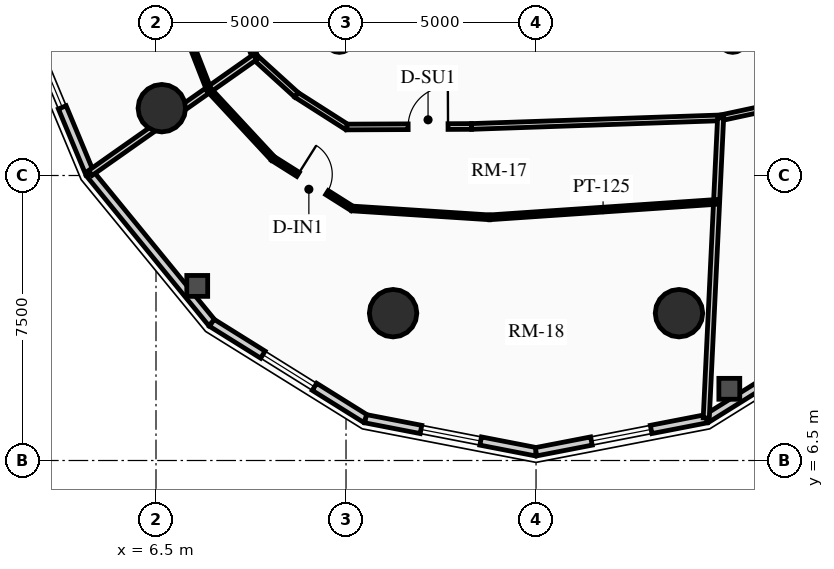
"""IFC4 building model, lengths in metres.
Left out: names, types, materials, properties, quantities, classifications, styles, units other than length and angle.
Written with IfcOpenShell. Run it as: python <this file> out.ifc"""

import sys

from ifc_helpers import new_model, si_unit, direction, frame, frame_2d, origin, origin_2d, place, context, subcontext, project, spatial, rectangle, circle, hollow_circle, extrude, source, transform, mapped, element, fill, save


model = new_model("IFC4")
c1 = context("Model", 3, precision=1e-05, world=origin(), true_north=direction((0.0, 1.0)))
c2 = subcontext(c1, "Body", "Model", "MODEL_VIEW")
j1 = project(units=[si_unit("LENGTHUNIT", "METRE"), si_unit("PLANEANGLEUNIT", "RADIAN")], contexts=[c1])
p1 = place(None, origin())
s1 = spatial("IfcSite", under=j1, at=p1, CompositionType="ELEMENT")
p2 = place(p1, origin())
s2 = spatial("IfcBuilding", under=s1, at=p2, CompositionType="ELEMENT")
p3 = place(p2, frame((0.0, 0.0, 166.15)))
s3 = spatial("IfcBuildingStorey", under=s2, at=p3, CompositionType="ELEMENT", Elevation=166.15)
for number, where, z_axis, x_axis in (
    (1, (11.325, 17.62, 0.0), (0.0, 0.0, 1.0), (1.0, 0.0, 0.0)),
    (2, (21.675, 17.62, 0.0), (0.0, 0.0, 1.0), (1.0, 0.0, 0.0)),
):
    element("IfcColumn", number, at=place(p3, frame(where, z_axis=z_axis, x_axis=x_axis)), inside=s3, PredefinedType="COLUMN", context=c2, shape_type="SweptSolid", body=[
        extrude(hollow_circle(Radius=0.38, WallThickness=0.032, at=origin_2d()), origin(), (0.0, 0.0, 1.0), 2.91),
    ])
for number, where, z_axis, x_axis in (
    (3, (6.653, 15.771, 0.0), (0.0, 0.0, 1.0), (1.0, 0.0, 0.0)),
    (4, (12.739, 10.377, 0.0), (0.0, 0.0, 1.0), (1.0, 0.0, 0.0)),
    (5, (20.261, 10.377, 0.0), (0.0, 0.0, 1.0), (1.0, 0.0, 0.0)),
):
    element("IfcColumn", number, at=place(p3, frame(where, z_axis=z_axis, x_axis=x_axis)), inside=s3, PredefinedType="USERDEFINED", context=c2, shape_type="SweptSolid", body=[
        extrude(circle(Radius=0.625, at=origin_2d()), origin(), (0.0, 0.0, 1.0), 2.91),
    ])
p4 = place(p3, frame((4.757, 14.055, 0.0), z_axis=(0.0, 0.0, 1.0), x_axis=(-0.384259959969, 0.923224936386, 0.0)))
e6 = element("IfcWall", 6, at=p4, inside=s3, PredefinedType="SOLIDWALL", context=c2, shape_type="SweptSolid", body=[
    extrude(rectangle(XDim=5.365, YDim=0.22, at=frame_2d((2.683, 0.0))), origin(), (0.0, 0.0, 1.0), 2.675),
])
m1 = source(origin(), c2, "Body", "SweptSolid", [
    extrude(rectangle(XDim=1.6, YDim=1.3, at=frame_2d((0.8, 0.65))), frame((0.0, 0.12, 0.0), z_axis=(0.0, -1.0, 0.0), x_axis=(1.0, 0.0, 0.0)), (0.0, 0.0, 1.0), 0.24),
])
p5 = place(p4, frame((1.883, 0.0, 0.65)))
e7 = element("IfcOpeningElement", 7, at=p5, cuts=e6, PredefinedType="OPENING", context=c2, shape_type="MappedRepresentation", body=[
    mapped(m1, transform((0.0, 0.0, 0.0), x_axis=(1.0, 0.0, 0.0), y_axis=(0.0, 1.0, 0.0), z_axis=(0.0, 0.0, 1.0), scale=1.0)),
])
p6 = place(p3, frame((7.968, 10.124, 0.0), z_axis=(0.0, 0.0, 1.0), x_axis=(-0.632598524901, 0.774479894053, 0.0)))
e8 = element("IfcWall", 8, at=p6, inside=s3, PredefinedType="SOLIDWALL", context=c2, shape_type="SweptSolid", body=[
    extrude(rectangle(XDim=5.076, YDim=0.22, at=frame_2d((2.538, 0.0))), origin(), (0.0, 0.0, 1.0), 2.675),
])
p7 = place(p3, frame((12.015, 7.6, 0.0), z_axis=(0.0, 0.0, 1.0), x_axis=(-0.848452391194, 0.529271707044, 0.0)))
e9 = element("IfcWall", 9, at=p7, inside=s3, PredefinedType="SOLIDWALL", context=c2, shape_type="SweptSolid", body=[
    extrude(rectangle(XDim=4.769, YDim=0.22, at=frame_2d((2.385, 0.0))), origin(), (0.0, 0.0, 1.0), 2.675),
])
p8 = place(p7, frame((1.585, 0.0, 0.65)))
e10 = element("IfcOpeningElement", 10, at=p8, cuts=e9, PredefinedType="OPENING", context=c2, shape_type="MappedRepresentation", body=[
    mapped(m1, transform((0.0, 0.0, 0.0), x_axis=(1.0, 0.0, 0.0), y_axis=(0.0, 1.0, 0.0), z_axis=(0.0, 0.0, 1.0), scale=1.0)),
])
p9 = place(p3, frame((16.5, 6.73, 0.0), z_axis=(0.0, 0.0, 1.0), x_axis=(-0.981718699963, 0.190337579429, 0.0)))
e11 = element("IfcWall", 11, at=p9, inside=s3, PredefinedType="SOLIDWALL", context=c2, shape_type="SweptSolid", body=[
    extrude(rectangle(XDim=4.569, YDim=0.22, at=frame_2d((2.284, 0.0))), origin(), (0.0, 0.0, 1.0), 2.675),
])
p10 = place(p9, frame((1.484, 0.0, 0.65)))
e12 = element("IfcOpeningElement", 12, at=p10, cuts=e11, PredefinedType="OPENING", context=c2, shape_type="MappedRepresentation", body=[
    mapped(m1, transform((0.0, 0.0, 0.0), x_axis=(1.0, 0.0, 0.0), y_axis=(0.0, 1.0, 0.0), z_axis=(0.0, 0.0, 1.0), scale=1.0)),
])
p11 = place(p3, frame((20.985, 7.6, 0.0), z_axis=(0.0, 0.0, 1.0), x_axis=(-0.981718699963, -0.190337579429, 0.0)))
e13 = element("IfcWall", 13, at=p11, inside=s3, PredefinedType="SOLIDWALL", context=c2, shape_type="SweptSolid", body=[
    extrude(rectangle(XDim=4.569, YDim=0.22, at=frame_2d((2.284, 0.0))), origin(), (0.0, 0.0, 1.0), 2.675),
])
p12 = place(p11, frame((1.484, 0.0, 0.65)))
e14 = element("IfcOpeningElement", 14, at=p12, cuts=e13, PredefinedType="OPENING", context=c2, shape_type="MappedRepresentation", body=[
    mapped(m1, transform((0.0, 0.0, 0.0), x_axis=(1.0, 0.0, 0.0), y_axis=(0.0, 1.0, 0.0), z_axis=(0.0, 0.0, 1.0), scale=1.0)),
])
p13 = place(p3, frame((25.032, 10.124, 0.0), z_axis=(0.0, 0.0, 1.0), x_axis=(-0.848452391194, -0.529271707044, 0.0)))
e15 = element("IfcWall", 15, at=p13, inside=s3, PredefinedType="SOLIDWALL", context=c2, shape_type="SweptSolid", body=[
    extrude(rectangle(XDim=4.769, YDim=0.22, at=frame_2d((2.385, 0.0))), origin(), (0.0, 0.0, 1.0), 2.675),
])
p14 = place(p3, frame((8.636, 18.436, 0.0), z_axis=(0.0, 0.0, 1.0), x_axis=(0.333211866524, -0.942851977782, 0.0)))
e16 = element("IfcWall", 16, at=p14, inside=s3, PredefinedType="PARTITIONING", context=c2, shape_type="SweptSolid", body=[
    extrude(rectangle(XDim=1.402, YDim=0.15, at=frame_2d((0.701, 0.0))), origin(), (0.0, 0.0, 1.0), 2.245),
])
p15 = place(p3, frame((9.103, 17.115, 0.0), z_axis=(0.0, 0.0, 1.0), x_axis=(0.740186897911, -0.672401186912, 0.0)))
e17 = element("IfcWall", 17, at=p15, inside=s3, PredefinedType="PARTITIONING", context=c2, shape_type="SweptSolid", body=[
    extrude(rectangle(XDim=1.477, YDim=0.15, at=frame_2d((0.738, 0.0))), origin(), (0.0, 0.0, 1.0), 2.245),
])
p16 = place(p3, frame((10.196, 16.122, 0.0), z_axis=(0.0, 0.0, 1.0), x_axis=(0.843021142441, -0.537880426673, 0.0)))
e18 = element("IfcWall", 18, at=p16, inside=s3, PredefinedType="PARTITIONING", context=c2, shape_type="SweptSolid", body=[
    extrude(rectangle(XDim=1.571, YDim=0.15, at=frame_2d((0.786, 0.0))), origin(), (0.0, 0.0, 1.0), 2.245),
])
p17 = place(p3, frame((11.521, 15.276, 0.0), z_axis=(0.0, 0.0, 1.0), x_axis=(0.999990688463, 0.004315436007, 0.0)))
e19 = element("IfcWall", 19, at=p17, inside=s3, PredefinedType="PARTITIONING", context=c2, shape_type="SweptSolid", body=[
    extrude(rectangle(XDim=3.281, YDim=0.15, at=frame_2d((1.641, 0.0))), origin(), (0.0, 0.0, 1.0), 2.245),
])
m2 = source(origin(), c2, "Body", "SweptSolid", [
    extrude(rectangle(XDim=1.05, YDim=2.015, at=frame_2d((0.525, 1.007))), frame((0.0, 0.085, 0.0), z_axis=(0.0, -1.0, 0.0), x_axis=(1.0, 0.0, 0.0)), (0.0, 0.0, 1.0), 0.17),
])
p18 = place(p17, frame((1.613, 0.0, 0.0)))
e20 = element("IfcOpeningElement", 20, at=p18, cuts=e19, PredefinedType="OPENING", context=c2, shape_type="MappedRepresentation", body=[
    mapped(m2, transform((0.0, 0.0, 0.0), x_axis=(1.0, 0.0, 0.0), y_axis=(0.0, 1.0, 0.0), z_axis=(0.0, 0.0, 1.0), scale=1.0)),
])
p19 = place(p3, frame((14.802, 15.291, 0.0), z_axis=(0.0, 0.0, 1.0), x_axis=(0.999405778293, 0.034468686011, 0.0)))
e21 = element("IfcWall", 21, at=p19, inside=s3, PredefinedType="PARTITIONING", context=c2, shape_type="SweptSolid", body=[
    extrude(rectangle(XDim=6.559, YDim=0.15, at=frame_2d((3.279, 0.0))), origin(), (0.0, 0.0, 1.0), 2.245),
])
p20 = place(p3, frame((21.357, 15.517, 0.0), z_axis=(0.0, 0.0, 1.0), x_axis=(0.977773676035, 0.209663154733, 0.0)))
e22 = element("IfcWall", 22, at=p20, inside=s3, PredefinedType="PARTITIONING", context=c2, shape_type="SweptSolid", body=[
    extrude(rectangle(XDim=1.865, YDim=0.15, at=frame_2d((0.933, 0.0))), origin(), (0.0, 0.0, 1.0), 2.245),
])
p21 = place(p3, frame((9.103, 17.115, 0.0), z_axis=(0.0, 0.0, 1.0), x_axis=(-0.817760605426, -0.575558504597, 0.0)))
e23 = element("IfcWall", 23, at=p21, inside=s3, PredefinedType="PARTITIONING", context=c2, shape_type="SweptSolid", body=[
    extrude(rectangle(XDim=5.295, YDim=0.16, at=frame_2d((2.647, 0.0))), origin(), (0.0, 0.0, 1.0), 2.245),
])
p22 = place(p3, frame((21.357, 15.517, 0.0), z_axis=(0.0, 0.0, 1.0), x_axis=(-0.047796931987, -0.998857073506, 0.0)))
e24 = element("IfcWall", 24, at=p22, inside=s3, PredefinedType="PARTITIONING", context=c2, shape_type="SweptSolid", body=[
    extrude(rectangle(XDim=7.907, YDim=0.16, at=frame_2d((3.954, 0.0))), origin(), (0.0, 0.0, 1.0), 2.245),
])
p23 = place(p3, frame((22.05, 18.0, 0.0), z_axis=(0.0, 0.0, 1.0), x_axis=(0.890660222535, -0.454669515136, 0.0)))
e25 = element("IfcWall", 25, at=p23, inside=s3, PredefinedType="PARTITIONING", context=c2, shape_type="SweptSolid", body=[
    extrude(rectangle(XDim=2.144, YDim=0.16, at=frame_2d((1.072, 0.0))), origin(), (0.0, 0.0, 1.0), 2.245),
])
m3 = source(origin(), c2, "Body", "SweptSolid", [
    extrude(rectangle(XDim=1.05, YDim=2.015, at=frame_2d((0.525, 1.007))), frame((0.0, 0.09, 0.0), z_axis=(0.0, -1.0, 0.0), x_axis=(1.0, 0.0, 0.0)), (0.0, 0.0, 1.0), 0.18),
])
p24 = place(p23, frame((0.894, 0.0, 0.0)))
e26 = element("IfcOpeningElement", 26, at=p24, cuts=e25, PredefinedType="OPENING", context=c2, shape_type="MappedRepresentation", body=[
    mapped(m3, transform((0.0, 0.0, 0.0), x_axis=(1.0, 0.0, 0.0), y_axis=(0.0, 1.0, 0.0), z_axis=(0.0, 0.0, 1.0), scale=1.0)),
])
p25 = place(p3, frame((6.978, 18.598, 0.0), z_axis=(0.0, 0.0, 1.0), x_axis=(0.363845250376, -0.931459410698, 0.0)))
e27 = element("IfcWall", 27, at=p25, inside=s3, PredefinedType="PARTITIONING", context=c2, shape_type="SweptSolid", body=[
    extrude(rectangle(XDim=2.509, YDim=0.125, at=frame_2d((1.254, 0.0))), origin(), (0.0, 0.0, 1.0), 2.245),
])
p26 = place(p3, frame((7.891, 16.261, 0.0), z_axis=(0.0, 0.0, 1.0), x_axis=(0.680443535441, -0.7328005152, 0.0)))
e28 = element("IfcWall", 28, at=p26, inside=s3, PredefinedType="PARTITIONING", context=c2, shape_type="SweptSolid", body=[
    extrude(rectangle(XDim=2.476, YDim=0.125, at=frame_2d((1.238, 0.0))), origin(), (0.0, 0.0, 1.0), 2.245),
])
p27 = place(p3, frame((9.576, 14.447, 0.0), z_axis=(0.0, 0.0, 1.0), x_axis=(0.845905204383, -0.53333327779, 0.0)))
e29 = element("IfcWall", 29, at=p27, inside=s3, PredefinedType="PARTITIONING", context=c2, shape_type="SweptSolid", body=[
    extrude(rectangle(XDim=2.465, YDim=0.125, at=frame_2d((1.232, 0.0))), origin(), (0.0, 0.0, 1.0), 2.245),
])
m4 = source(origin(), c2, "Body", "SweptSolid", [
    extrude(rectangle(XDim=0.9, YDim=2.005, at=frame_2d((0.45, 1.002))), frame((0.0, 0.073, 0.0), z_axis=(0.0, -1.0, 0.0), x_axis=(1.0, 0.0, 0.0)), (0.0, 0.0, 1.0), 0.145),
])
p28 = place(p27, frame((0.782, 0.0, 0.0)))
e30 = element("IfcOpeningElement", 30, at=p28, cuts=e29, PredefinedType="OPENING", context=c2, shape_type="MappedRepresentation", body=[
    mapped(m4, transform((0.0, 0.0, 0.0), x_axis=(1.0, 0.0, 0.0), y_axis=(0.0, 1.0, 0.0), z_axis=(0.0, 0.0, 1.0), scale=1.0)),
])
p29 = place(p3, frame((11.661, 13.132, 0.0), z_axis=(0.0, 0.0, 1.0), x_axis=(0.997932841329, -0.064265419915, 0.0)))
e31 = element("IfcWall", 31, at=p29, inside=s3, PredefinedType="PARTITIONING", context=c2, shape_type="SweptSolid", body=[
    extrude(rectangle(XDim=3.624, YDim=0.125, at=frame_2d((1.812, 0.0))), origin(), (0.0, 0.0, 1.0), 2.245),
])
p30 = place(p3, frame((15.278, 12.899, 0.0), z_axis=(0.0, 0.0, 1.0), x_axis=(0.997695501463, 0.067850470592, 0.0)))
e32 = element("IfcWall", 32, at=p30, inside=s3, PredefinedType="PARTITIONING", context=c2, shape_type="SweptSolid", body=[
    extrude(rectangle(XDim=5.988, YDim=0.125, at=frame_2d((2.994, 0.0))), origin(), (0.0, 0.0, 1.0), 2.245),
])
m5 = source(origin(), c2, "Body", "SweptSolid", [
    extrude(rectangle(XDim=1.6, YDim=1.3, at=frame_2d((0.8, 0.65))), frame((0.0, 0.03, 0.0), z_axis=(0.0, -1.0, 0.0), x_axis=(1.0, 0.0, 0.0)), (0.0, 0.0, 1.0), 0.06),
])
p31 = place(p5, origin())
e33 = element("IfcWindow", 33, at=p31, inside=s3, PartitioningType="SINGLE_PANEL", PredefinedType="WINDOW", context=c2, shape_type="MappedRepresentation", body=[
    mapped(m5, transform((0.0, 0.0, 0.0), x_axis=(1.0, 0.0, 0.0), y_axis=(0.0, 1.0, 0.0), z_axis=(0.0, 0.0, 1.0), scale=1.0)),
])
fill(e7, e33)
p32 = place(p8, origin())
e34 = element("IfcWindow", 34, at=p32, inside=s3, PartitioningType="SINGLE_PANEL", PredefinedType="WINDOW", context=c2, shape_type="MappedRepresentation", body=[
    mapped(m5, transform((0.0, 0.0, 0.0), x_axis=(1.0, 0.0, 0.0), y_axis=(0.0, 1.0, 0.0), z_axis=(0.0, 0.0, 1.0), scale=1.0)),
])
fill(e10, e34)
p33 = place(p10, origin())
e35 = element("IfcWindow", 35, at=p33, inside=s3, PartitioningType="SINGLE_PANEL", PredefinedType="WINDOW", context=c2, shape_type="MappedRepresentation", body=[
    mapped(m5, transform((0.0, 0.0, 0.0), x_axis=(1.0, 0.0, 0.0), y_axis=(0.0, 1.0, 0.0), z_axis=(0.0, 0.0, 1.0), scale=1.0)),
])
fill(e12, e35)
p34 = place(p12, origin())
e36 = element("IfcWindow", 36, at=p34, inside=s3, PartitioningType="SINGLE_PANEL", PredefinedType="WINDOW", context=c2, shape_type="MappedRepresentation", body=[
    mapped(m5, transform((0.0, 0.0, 0.0), x_axis=(1.0, 0.0, 0.0), y_axis=(0.0, 1.0, 0.0), z_axis=(0.0, 0.0, 1.0), scale=1.0)),
])
fill(e14, e36)
m6 = source(origin(), c2, "Body", "SweptSolid", [
    extrude(rectangle(XDim=1.05, YDim=2.015, at=frame_2d((0.525, 1.007))), frame((0.0, 0.025, 0.0), z_axis=(0.0, -1.0, 0.0), x_axis=(1.0, 0.0, 0.0)), (0.0, 0.0, 1.0), 0.05),
])
p35 = place(p18, origin())
e37 = element("IfcDoor", 37, at=p35, inside=s3, OperationType="SINGLE_SWING_RIGHT", PredefinedType="DOOR", context=c2, shape_type="MappedRepresentation", body=[
    mapped(m6, transform((0.0, 0.0, 0.0), x_axis=(1.0, 0.0, 0.0), y_axis=(0.0, 1.0, 0.0), z_axis=(0.0, 0.0, 1.0), scale=1.0)),
])
fill(e20, e37)
m7 = source(origin(), c2, "Body", "SweptSolid", [
    extrude(rectangle(XDim=0.9, YDim=2.005, at=frame_2d((0.45, 1.002))), frame((0.0, 0.025, 0.0), z_axis=(0.0, -1.0, 0.0), x_axis=(1.0, 0.0, 0.0)), (0.0, 0.0, 1.0), 0.05),
])
p36 = place(p28, origin())
e38 = element("IfcDoor", 38, at=p36, inside=s3, OperationType="SINGLE_SWING_LEFT", PredefinedType="DOOR", context=c2, shape_type="MappedRepresentation", body=[
    mapped(m7, transform((0.0, 0.0, 0.0), x_axis=(1.0, 0.0, 0.0), y_axis=(0.0, 1.0, 0.0), z_axis=(0.0, 0.0, 1.0), scale=1.0)),
])
fill(e30, e38)
save(model, sys.argv[1])
